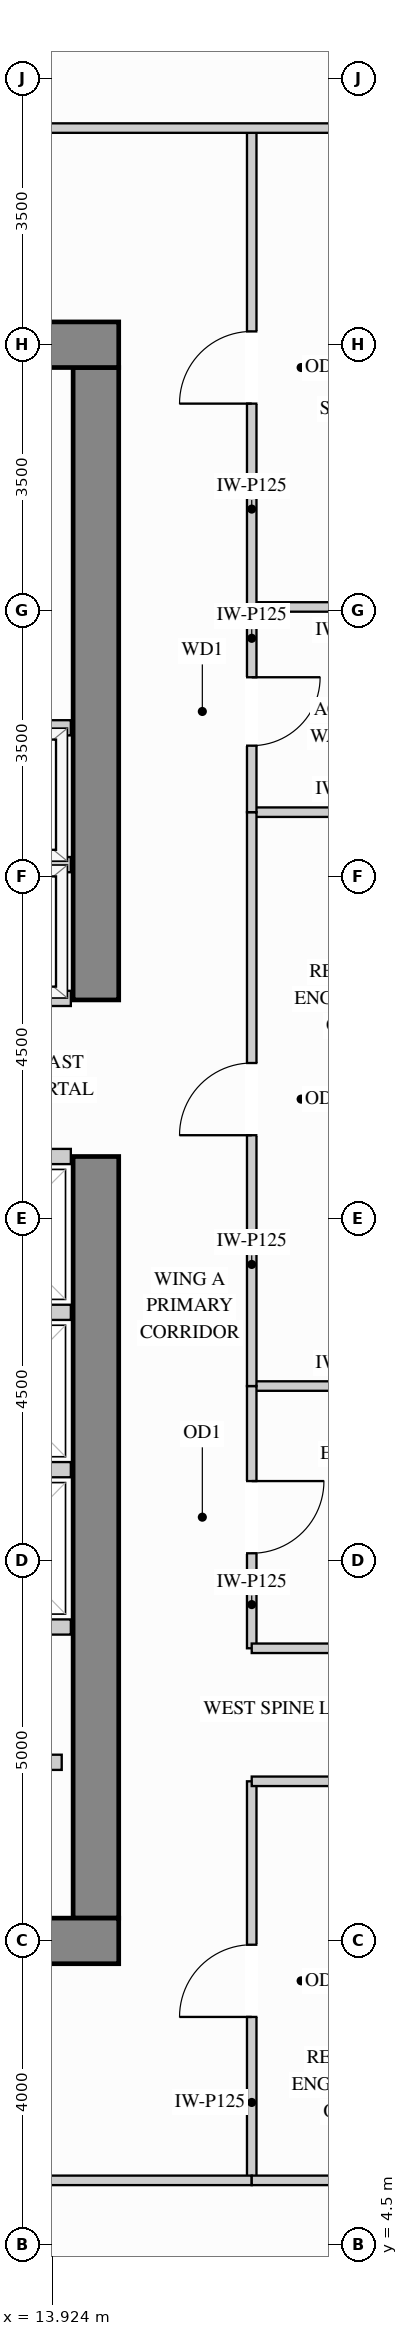
"""IFC4 building model, lengths in metres.
Left out: names, types, materials, properties, quantities, classifications, styles, units other than length and angle.
Written with IfcOpenShell. Run it as: python <this file> out.ifc"""

import sys

from ifc_helpers import new_model, si_unit, direction, frame, frame_2d, origin, place, context, subcontext, project, spatial, rectangle, extrude, source, transform, mapped, element, fill, save


model = new_model("IFC4")
c1 = context("Model", 3, precision=1e-05, world=origin(), true_north=direction((0.0, 1.0)))
c2 = subcontext(c1, "Body", "Model", "MODEL_VIEW")
j1 = project(units=[si_unit("LENGTHUNIT", "METRE"), si_unit("PLANEANGLEUNIT", "RADIAN")], contexts=[c1])
p1 = place(None, origin())
s1 = spatial("IfcSite", under=j1, at=p1, CompositionType="ELEMENT")
p2 = place(p1, origin())
s2 = spatial("IfcBuilding", under=s1, at=p2, CompositionType="ELEMENT")
p3 = place(p2, frame((0.0, 0.0, 161.1)))
s3 = spatial("IfcBuildingStorey", under=s2, at=p3, CompositionType="ELEMENT", Elevation=161.1)
m1 = source(origin(), c2, "Body", "SweptSolid", [
    extrude(rectangle(XDim=10.02, YDim=0.6, at=frame_2d((5.01, 0.0))), origin(), (0.0, 0.0, 1.0), 3.4),
])
p4 = place(p3, frame((14.5, 8.8, 0.0), z_axis=(0.0, 0.0, 1.0), x_axis=(0.0, 1.0, 0.0)))
e1 = element("IfcWall", 1, at=p4, inside=s3, PredefinedType="SHEAR", context=c2, shape_type="MappedRepresentation", body=[
    mapped(m1, transform((0.0, 0.0, 0.0), x_axis=(1.0, 0.0, 0.0), y_axis=(0.0, 1.0, 0.0), z_axis=(0.0, 0.0, 1.0))),
])
m2 = source(origin(), c2, "Body", "SweptSolid", [
    extrude(rectangle(XDim=8.32, YDim=0.6, at=frame_2d((4.16, 0.0))), origin(), (0.0, 0.0, 1.0), 3.4),
])
p5 = place(p3, frame((14.5, 20.88, 0.0), z_axis=(0.0, 0.0, 1.0), x_axis=(0.0, 1.0, 0.0)))
e2 = element("IfcWall", 2, at=p5, inside=s3, PredefinedType="SHEAR", context=c2, shape_type="MappedRepresentation", body=[
    mapped(m2, transform((0.0, 0.0, 0.0), x_axis=(1.0, 0.0, 0.0), y_axis=(0.0, 1.0, 0.0), z_axis=(0.0, 0.0, 1.0))),
])
m3 = source(origin(), c2, "Body", "SweptSolid", [
    extrude(rectangle(XDim=10.6, YDim=0.6, at=frame_2d((5.3, 0.0))), origin(), (0.0, 0.0, 1.0), 3.4),
])
for number, where, z_axis, x_axis in (
    (3, (4.2, 29.5, 0.0), (0.0, 0.0, 1.0), (1.0, 0.0, 0.0)),
    (4, (4.2, 8.5, 0.0), (0.0, 0.0, 1.0), (1.0, 0.0, 0.0)),
):
    element("IfcWall", number, at=place(p3, frame(where, z_axis=z_axis, x_axis=x_axis)), inside=s3, PredefinedType="SHEAR", context=c2, shape_type="MappedRepresentation", body=[
        mapped(m3, transform((0.0, 0.0, 0.0), x_axis=(1.0, 0.0, 0.0), y_axis=(0.0, 1.0, 0.0), z_axis=(0.0, 0.0, 1.0))),
    ])
m4 = source(origin(), c2, "Body", "SweptSolid", [
    extrude(rectangle(XDim=2.6, YDim=0.125, at=frame_2d((1.3, 0.0))), origin(), (0.0, 0.0, 1.0), 3.385),
])
p6 = place(p3, frame((16.55, 15.8, 0.0), z_axis=(0.0, 0.0, 1.0), x_axis=(1.0, 0.0, 0.0)))
e5 = element("IfcWall", 5, at=p6, inside=s3, PredefinedType="PARTITIONING", context=c2, shape_type="MappedRepresentation", body=[
    mapped(m4, transform((0.0, 0.0, 0.0), x_axis=(1.0, 0.0, 0.0), y_axis=(0.0, 1.0, 0.0), z_axis=(0.0, 0.0, 1.0))),
])
m5 = source(origin(), c2, "Body", "SweptSolid", [
    extrude(rectangle(XDim=2.598, YDim=0.125, at=frame_2d((1.299, 0.0))), origin(), (0.0, 0.0, 1.0), 3.385),
])
for number, where, z_axis, x_axis in (
    (6, (16.55, 23.35, 0.0), (0.0, 0.0, 1.0), (1.0, 0.0, 0.0)),
    (7, (16.55, 26.05, 0.0), (0.0, 0.0, 1.0), (1.0, 0.0, 0.0)),
):
    element("IfcWall", number, at=place(p3, frame(where, z_axis=z_axis, x_axis=x_axis)), inside=s3, PredefinedType="PARTITIONING", context=c2, shape_type="MappedRepresentation", body=[
        mapped(m5, transform((0.0, 0.0, 0.0), x_axis=(1.0, 0.0, 0.0), y_axis=(0.0, 1.0, 0.0), z_axis=(0.0, 0.0, 1.0))),
    ])
p7 = place(p3, frame((16.55, 12.35, 0.0), z_axis=(0.0, 0.0, 1.0), x_axis=(0.0, 1.0, 0.0)))
e8 = element("IfcWall", 8, at=p7, inside=s3, PredefinedType="PARTITIONING", context=c2, shape_type="SweptSolid", body=[
    extrude(rectangle(XDim=3.45, YDim=0.125, at=frame_2d((1.725, 0.0))), origin(), (0.0, 0.0, 1.0), 3.385),
])
p8 = place(p7, frame((1.25, 0.0, 0.0)))
e9 = element("IfcOpeningElement", 9, at=p8, cuts=e8, PredefinedType="OPENING", context=c2, shape_type="SweptSolid", body=[
    extrude(rectangle(XDim=0.95, YDim=2.15, at=frame_2d((0.475, 1.075))), frame((0.0, 0.073, 0.0), z_axis=(0.0, -1.0, 0.0), x_axis=(1.0, 0.0, 0.0)), (0.0, 0.0, 1.0), 0.145),
])
p9 = place(p3, frame((16.55, 15.8, 0.0), z_axis=(0.0, 0.0, 1.0), x_axis=(0.0, 1.0, 0.0)))
e10 = element("IfcWall", 10, at=p9, inside=s3, PredefinedType="PARTITIONING", context=c2, shape_type="SweptSolid", body=[
    extrude(rectangle(XDim=7.55, YDim=0.125, at=frame_2d((3.775, 0.0))), origin(), (0.0, 0.0, 1.0), 3.385),
])
p10 = place(p9, frame((3.3, 0.0, 0.0)))
e11 = element("IfcOpeningElement", 11, at=p10, cuts=e10, PredefinedType="OPENING", context=c2, shape_type="SweptSolid", body=[
    extrude(rectangle(XDim=0.95, YDim=2.15, at=frame_2d((0.475, 1.075))), frame((0.0, 0.073, 0.0), z_axis=(0.0, -1.0, 0.0), x_axis=(1.0, 0.0, 0.0)), (0.0, 0.0, 1.0), 0.145),
])
p11 = place(p3, frame((16.55, 26.05, 0.0), z_axis=(0.0, 0.0, 1.0), x_axis=(0.0, 1.0, 0.0)))
e12 = element("IfcWall", 12, at=p11, inside=s3, PredefinedType="PARTITIONING", context=c2, shape_type="SweptSolid", body=[
    extrude(rectangle(XDim=6.3, YDim=0.125, at=frame_2d((3.15, 0.0))), origin(), (0.0, 0.0, 1.0), 3.385),
])
p12 = place(p11, frame((2.675, 0.0, 0.0)))
e13 = element("IfcOpeningElement", 13, at=p12, cuts=e12, PredefinedType="OPENING", context=c2, shape_type="SweptSolid", body=[
    extrude(rectangle(XDim=0.95, YDim=2.15, at=frame_2d((0.475, 1.075))), frame((0.0, 0.073, 0.0), z_axis=(0.0, -1.0, 0.0), x_axis=(1.0, 0.0, 0.0)), (0.0, 0.0, 1.0), 0.145),
])
p13 = place(p3, frame((16.55, 5.35, 0.0), z_axis=(0.0, 0.0, 1.0), x_axis=(0.0, 1.0, 0.0)))
e14 = element("IfcWall", 14, at=p13, inside=s3, PredefinedType="PARTITIONING", context=c2, shape_type="SweptSolid", body=[
    extrude(rectangle(XDim=5.25, YDim=0.125, at=frame_2d((2.625, 0.0))), origin(), (0.0, 0.0, 1.0), 3.385),
])
p14 = place(p13, frame((2.15, 0.0, 0.0)))
e15 = element("IfcOpeningElement", 15, at=p14, cuts=e14, PredefinedType="OPENING", context=c2, shape_type="SweptSolid", body=[
    extrude(rectangle(XDim=0.95, YDim=2.15, at=frame_2d((0.475, 1.075))), frame((0.0, 0.073, 0.0), z_axis=(0.0, -1.0, 0.0), x_axis=(1.0, 0.0, 0.0)), (0.0, 0.0, 1.0), 0.145),
])
p15 = place(p3, frame((16.55, 23.35, 0.0), z_axis=(0.0, 0.0, 1.0), x_axis=(0.0, 1.0, 0.0)))
e16 = element("IfcWall", 16, at=p15, inside=s3, PredefinedType="PARTITIONING", context=c2, shape_type="SweptSolid", body=[
    extrude(rectangle(XDim=2.7, YDim=0.125, at=frame_2d((1.35, 0.0))), origin(), (0.0, 0.0, 1.0), 3.385),
])
p16 = place(p15, frame((0.875, 0.0, 0.0)))
e17 = element("IfcOpeningElement", 17, at=p16, cuts=e16, PredefinedType="OPENING", context=c2, shape_type="SweptSolid", body=[
    extrude(rectangle(XDim=0.9, YDim=2.15, at=frame_2d((0.45, 1.075))), frame((0.0, 0.073, 0.0), z_axis=(0.0, -1.0, 0.0), x_axis=(1.0, 0.0, 0.0)), (0.0, 0.0, 1.0), 0.145),
])
m6 = source(origin(), c2, "Body", "SweptSolid", [
    extrude(rectangle(XDim=5.798, YDim=0.125, at=frame_2d((2.899, 0.0))), origin(), (0.0, 0.0, 1.0), 3.385),
])
p17 = place(p3, frame((13.35, 32.35, 0.0), z_axis=(0.0, 0.0, 1.0), x_axis=(1.0, 0.0, 0.0)))
e18 = element("IfcWall", 18, at=p17, inside=s3, PredefinedType="PARTITIONING", context=c2, shape_type="MappedRepresentation", body=[
    mapped(m6, transform((0.0, 0.0, 0.0), x_axis=(1.0, 0.0, 0.0), y_axis=(0.0, 1.0, 0.0), z_axis=(0.0, 0.0, 1.0))),
])
m7 = source(origin(), c2, "Body", "SweptSolid", [
    extrude(rectangle(XDim=2.95, YDim=0.125, at=frame_2d((1.475, 0.0))), origin(), (0.0, 0.0, 1.0), 3.385),
])
for number, where, z_axis, x_axis in (
    (19, (16.55, 12.35, 0.0), (0.0, 0.0, 1.0), (1.0, 0.0, 0.0)),
    (20, (16.55, 10.6, 0.0), (0.0, 0.0, 1.0), (1.0, 0.0, 0.0)),
):
    element("IfcWall", number, at=place(p3, frame(where, z_axis=z_axis, x_axis=x_axis)), inside=s3, PredefinedType="PARTITIONING", context=c2, shape_type="MappedRepresentation", body=[
        mapped(m7, transform((0.0, 0.0, 0.0), x_axis=(1.0, 0.0, 0.0), y_axis=(0.0, 1.0, 0.0), z_axis=(0.0, 0.0, 1.0))),
    ])
p18 = place(p3, frame((8.889, 5.35, 0.0), z_axis=(0.0, 0.0, 1.0), x_axis=(1.0, 0.0, 0.0)))
e21 = element("IfcWall", 21, at=p18, inside=s3, PredefinedType="PARTITIONING", context=c2, shape_type="SweptSolid", body=[
    extrude(rectangle(XDim=7.661, YDim=0.125, at=frame_2d((3.831, 0.0))), origin(), (0.0, 0.0, 1.0), 3.385),
])
p19 = place(p18, frame((3.355, 0.0, 0.0)))
e22 = element("IfcOpeningElement", 22, at=p19, cuts=e21, PredefinedType="OPENING", context=c2, shape_type="SweptSolid", body=[
    extrude(rectangle(XDim=0.95, YDim=2.15, at=frame_2d((0.475, 1.075))), frame((0.0, 0.073, 0.0), z_axis=(0.0, -1.0, 0.0), x_axis=(1.0, 0.0, 0.0)), (0.0, 0.0, 1.0), 0.145),
])
p20 = place(p3, frame((16.55, 5.35, 0.0), z_axis=(0.0, 0.0, 1.0), x_axis=(1.0, 0.0, 0.0)))
e23 = element("IfcWall", 23, at=p20, inside=s3, PredefinedType="PARTITIONING", context=c2, shape_type="MappedRepresentation", body=[
    mapped(m5, transform((0.0, 0.0, 0.0), x_axis=(1.0, 0.0, 0.0), y_axis=(0.0, 1.0, 0.0), z_axis=(0.0, 0.0, 1.0))),
])
m8 = source(origin(), c2, "Body", "SweptSolid", [
    extrude(rectangle(XDim=1.63, YDim=0.2, at=frame_2d((0.815, 0.0))), origin(), (0.0, 0.0, 1.0), 3.385),
])
p21 = place(p3, frame((12.42, 10.85, 0.0), z_axis=(0.0, 0.0, 1.0), x_axis=(1.0, 0.0, 0.0)))
e24 = element("IfcWall", 24, at=p21, inside=s3, PredefinedType="PARTITIONING", context=c2, shape_type="MappedRepresentation", body=[
    mapped(m8, transform((0.0, 0.0, 0.0), x_axis=(1.0, 0.0, 0.0), y_axis=(0.0, 1.0, 0.0), z_axis=(0.0, 0.0, 1.0))),
])
m9 = source(origin(), c2, "Body", "SweptSolid", [
    extrude(rectangle(XDim=2.34, YDim=0.2, at=frame_2d((1.17, 0.0))), origin(), (0.0, 0.0, 1.0), 3.385),
])
for number, where, z_axis, x_axis in (
    (25, (11.83, 22.66, 0.0), (0.0, 0.0, 1.0), (1.0, 0.0, 0.0)),
    (26, (11.83, 20.9, 0.0), (0.0, 0.0, 1.0), (1.0, 0.0, 0.0)),
    (27, (11.83, 24.46, 0.0), (0.0, 0.0, 1.0), (1.0, 0.0, 0.0)),
):
    element("IfcWall", number, at=place(p3, frame(where, z_axis=z_axis, x_axis=x_axis)), inside=s3, PredefinedType="PARTITIONING", context=c2, shape_type="MappedRepresentation", body=[
        mapped(m9, transform((0.0, 0.0, 0.0), x_axis=(1.0, 0.0, 0.0), y_axis=(0.0, 1.0, 0.0), z_axis=(0.0, 0.0, 1.0))),
    ])
m10 = source(origin(), c2, "Body", "SweptSolid", [
    extrude(rectangle(XDim=1.94, YDim=0.2, at=frame_2d((0.97, 0.0))), origin(), (0.0, 0.0, 1.0), 3.385),
])
for number, where, z_axis, x_axis in (
    (28, (12.23, 14.7, 0.0), (0.0, 0.0, 1.0), (1.0, 0.0, 0.0)),
    (29, (12.23, 12.63, 0.0), (0.0, 0.0, 1.0), (1.0, 0.0, 0.0)),
    (30, (12.23, 16.77, 0.0), (0.0, 0.0, 1.0), (1.0, 0.0, 0.0)),
    (31, (12.23, 18.82, 0.0), (0.0, 0.0, 1.0), (1.0, 0.0, 0.0)),
):
    element("IfcWall", number, at=place(p3, frame(where, z_axis=z_axis, x_axis=x_axis)), inside=s3, PredefinedType="PARTITIONING", context=c2, shape_type="MappedRepresentation", body=[
        mapped(m10, transform((0.0, 0.0, 0.0), x_axis=(1.0, 0.0, 0.0), y_axis=(0.0, 1.0, 0.0), z_axis=(0.0, 0.0, 1.0))),
    ])
m11 = source(origin(), c2, "Body", "SweptSolid", [
    extrude(rectangle(XDim=0.95, YDim=2.15, at=frame_2d((0.475, 1.075))), frame((0.0, 0.025, 0.0), z_axis=(0.0, -1.0, 0.0), x_axis=(1.0, 0.0, 0.0)), (0.0, 0.0, 1.0), 0.05),
])
p22 = place(p14, origin())
e32 = element("IfcDoor", 32, at=p22, inside=s3, OperationType="SINGLE_SWING_LEFT", PredefinedType="DOOR", context=c2, shape_type="MappedRepresentation", body=[
    mapped(m11, transform((0.0, 0.0, 0.0), x_axis=(1.0, 0.0, 0.0), y_axis=(0.0, 1.0, 0.0), z_axis=(0.0, 0.0, 1.0))),
])
fill(e15, e32)
p23 = place(p8, origin())
e33 = element("IfcDoor", 33, at=p23, inside=s3, OperationType="SINGLE_SWING_RIGHT", PredefinedType="DOOR", context=c2, shape_type="MappedRepresentation", body=[
    mapped(m11, transform((0.0, 0.0, 0.0), x_axis=(1.0, 0.0, 0.0), y_axis=(0.0, 1.0, 0.0), z_axis=(0.0, 0.0, 1.0))),
])
fill(e9, e33)
p24 = place(p10, origin())
e34 = element("IfcDoor", 34, at=p24, inside=s3, OperationType="SINGLE_SWING_LEFT", PredefinedType="DOOR", context=c2, shape_type="MappedRepresentation", body=[
    mapped(m11, transform((0.0, 0.0, 0.0), x_axis=(1.0, 0.0, 0.0), y_axis=(0.0, 1.0, 0.0), z_axis=(0.0, 0.0, 1.0))),
])
fill(e11, e34)
p25 = place(p12, origin())
e35 = element("IfcDoor", 35, at=p25, inside=s3, OperationType="SINGLE_SWING_LEFT", PredefinedType="DOOR", context=c2, shape_type="MappedRepresentation", body=[
    mapped(m11, transform((0.0, 0.0, 0.0), x_axis=(1.0, 0.0, 0.0), y_axis=(0.0, 1.0, 0.0), z_axis=(0.0, 0.0, 1.0))),
])
fill(e13, e35)
m12 = source(origin(), c2, "Body", "SweptSolid", [
    extrude(rectangle(XDim=0.9, YDim=2.15, at=frame_2d((0.45, 1.075))), frame((0.0, 0.025, 0.0), z_axis=(0.0, -1.0, 0.0), x_axis=(1.0, 0.0, 0.0)), (0.0, 0.0, 1.0), 0.05),
])
p26 = place(p16, origin())
e36 = element("IfcDoor", 36, at=p26, inside=s3, OperationType="SINGLE_SWING_RIGHT", PredefinedType="DOOR", context=c2, shape_type="MappedRepresentation", body=[
    mapped(m12, transform((0.0, 0.0, 0.0), x_axis=(1.0, 0.0, 0.0), y_axis=(0.0, 1.0, 0.0), z_axis=(0.0, 0.0, 1.0))),
])
fill(e17, e36)
save(model, sys.argv[1])
